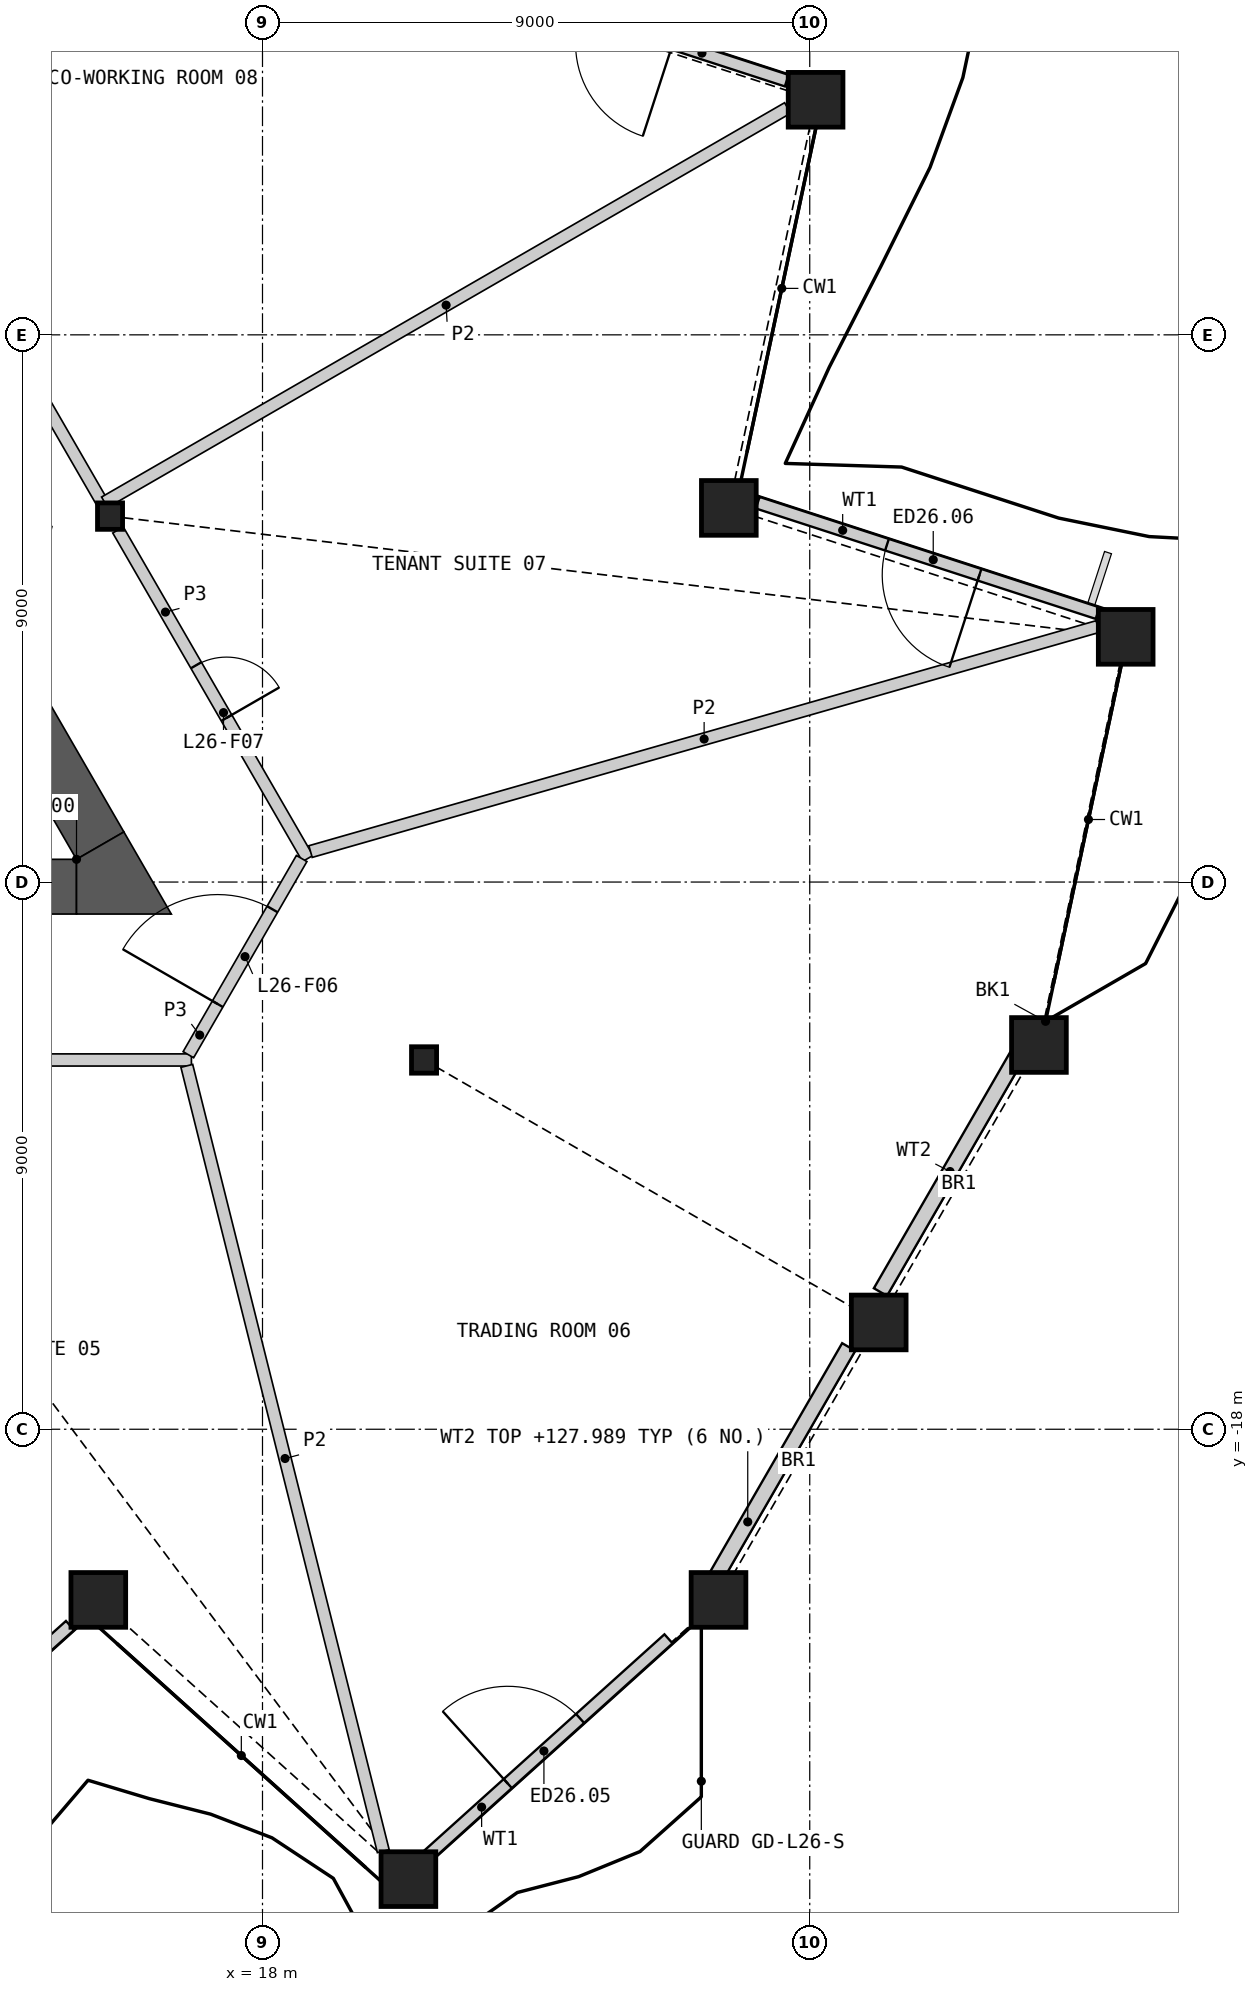
"""IFC4 building model, lengths in metres.
Left out: names, types, materials, properties, quantities, classifications, styles, units other than length and angle.
Written with IfcOpenShell. Run it as: python <this file> out.ifc"""

import sys

from ifc_helpers import new_model, si_unit, direction, frame, frame_2d, origin, origin_2d, place, context, subcontext, project, spatial, polyline, rectangle, hollow_rectangle, i_section, outline, extrude, element, fill, save


model = new_model("IFC4")
c1 = context("Model", 3, precision=1e-05, world=origin(), true_north=direction((0.0, 1.0)))
c2 = subcontext(c1, "Body", "Model", "MODEL_VIEW")
j1 = project(units=[si_unit("LENGTHUNIT", "METRE"), si_unit("PLANEANGLEUNIT", "RADIAN")], contexts=[c1])
p1 = place(None, origin())
s1 = spatial("IfcSite", under=j1, at=p1, CompositionType="ELEMENT")
p2 = place(p1, origin())
s2 = spatial("IfcBuilding", under=s1, at=p2, CompositionType="ELEMENT")
p3 = place(p2, frame((0.0, 0.0, 124.8)))
s3 = spatial("IfcBuildingStorey", under=s2, at=p3, CompositionType="ELEMENT", Elevation=124.8)
for number, where, z_axis, x_axis in (
    (1, (15.3, -20.807, 0.0), (0.0, 0.0, 1.0), (1.0, 0.0, 0.0)),
    (2, (20.4, -25.399, 0.0), (0.0, 0.0, 1.0), (1.0, 0.0, 0.0)),
    (3, (25.5, -20.807, 0.0), (0.0, 0.0, 1.0), (1.0, 0.0, 0.0)),
    (4, (28.135, -16.243, 0.0), (0.0, 0.0, 1.0), (1.0, 0.0, 0.0)),
    (5, (30.769, -11.68, 0.0), (0.0, 0.0, 1.0), (1.0, 0.0, 0.0)),
    (6, (32.196, -4.967, 0.0), (0.0, 0.0, 1.0), (1.0, 0.0, 0.0)),
    (7, (25.669, -2.846, 0.0), (0.0, 0.0, 1.0), (1.0, 0.0, 0.0)),
    (8, (27.096, 3.866, 0.0), (0.0, 0.0, 1.0), (1.0, 0.0, 0.0)),
):
    element("IfcColumn", number, at=place(p3, frame(where, z_axis=z_axis, x_axis=x_axis)), inside=s3, PredefinedType="COLUMN", context=c2, shape_type="SweptSolid", body=[
        extrude(hollow_rectangle(XDim=0.9, YDim=0.9, WallThickness=0.06, at=origin_2d()), origin(), (0.0, 0.0, 1.0), 4.2),
    ])
for number, where, z_axis, x_axis in (
    (9, (20.657, -11.926, 0.0), (0.0, 0.0, 1.0), (1.0, 0.0, 0.0)),
    (10, (15.493, -2.982, 0.0), (0.0, 0.0, 1.0), (1.0, 0.0, 0.0)),
):
    element("IfcColumn", number, at=place(p3, frame(where, z_axis=z_axis, x_axis=x_axis)), inside=s3, PredefinedType="COLUMN", context=c2, shape_type="SweptSolid", body=[
        extrude(i_section(OverallWidth=0.412, OverallDepth=0.435, WebThickness=0.036, FlangeThickness=0.057, at=origin_2d()), origin(), (0.0, 0.0, 1.0), 4.2),
    ])
p4 = place(p3, frame((10.492, -25.137, 0.0), z_axis=(0.0, 0.0, 1.0), x_axis=(0.743136230799, 0.669140151593, 0.0)))
e11 = element("IfcWall", 11, at=p4, inside=s3, PredefinedType="SOLIDWALL", context=c2, shape_type="SweptSolid", body=[
    extrude(rectangle(XDim=5.843, YDim=0.2, at=frame_2d((2.922, 0.0))), origin(), (0.0, 0.0, 1.0), 3.189),
])
p5 = place(p4, frame((1.957, 0.0, 0.0)))
e12 = element("IfcOpeningElement", 12, at=p5, cuts=e11, PredefinedType="OPENING", context=c2, shape_type="SweptSolid", body=[
    extrude(rectangle(XDim=1.6, YDim=2.4, at=frame_2d((0.8, 1.2))), frame((0.0, 0.11, 0.0), z_axis=(0.0, -1.0, 0.0), x_axis=(1.0, 0.0, 0.0)), (0.0, 0.0, 1.0), 0.22),
])
p6 = place(p3, frame((20.579, -25.137, 0.0), z_axis=(0.0, 0.0, 1.0), x_axis=(0.743148838472, 0.66912614945, 0.0)))
e13 = element("IfcWall", 13, at=p6, inside=s3, PredefinedType="SOLIDWALL", context=c2, shape_type="SweptSolid", body=[
    extrude(rectangle(XDim=5.515, YDim=0.2, at=frame_2d((2.757, 0.0))), origin(), (0.0, 0.0, 1.0), 3.189),
])
p7 = place(p6, frame((1.957, 0.0, 0.0)))
e14 = element("IfcOpeningElement", 14, at=p7, cuts=e13, PredefinedType="OPENING", context=c2, shape_type="SweptSolid", body=[
    extrude(rectangle(XDim=1.6, YDim=2.4, at=frame_2d((0.8, 1.2))), frame((0.0, 0.11, 0.0), z_axis=(0.0, -1.0, 0.0), x_axis=(1.0, 0.0, 0.0)), (0.0, 0.0, 1.0), 0.22),
])
p8 = place(p3, frame((25.427, -20.483, 0.0), z_axis=(0.0, 0.0, 1.0), x_axis=(0.499968989506, 0.866043306961, 0.0)))
e15 = element("IfcWall", 15, at=p8, inside=s3, PredefinedType="SOLIDWALL", context=c2, shape_type="SweptSolid", body=[
    extrude(rectangle(XDim=4.429, YDim=0.25, at=frame_2d((2.214, 0.0))), origin(), (0.0, 0.0, 1.0), 3.189),
])
p9 = place(p3, frame((28.163, -15.743, 0.0), z_axis=(0.0, 0.0, 1.0), x_axis=(0.500016357846, 0.866015959371, 0.0)))
e16 = element("IfcWall", 16, at=p9, inside=s3, PredefinedType="SOLIDWALL", context=c2, shape_type="SweptSolid", body=[
    extrude(rectangle(XDim=4.578, YDim=0.25, at=frame_2d((2.289, 0.0))), origin(), (0.0, 0.0, 1.0), 3.189),
])
p10 = place(p3, frame((31.734, -4.577, 0.0), z_axis=(0.0, 0.0, 1.0), x_axis=(-0.951060927669, 0.309003417231, 0.0)))
e17 = element("IfcWall", 17, at=p10, inside=s3, PredefinedType="SOLIDWALL", context=c2, shape_type="SweptSolid", body=[
    extrude(rectangle(XDim=5.877, YDim=0.2, at=frame_2d((2.939, 0.0))), origin(), (0.0, 0.0, 1.0), 3.189),
])
p11 = place(p10, frame((2.042, 0.0, 0.0)))
e18 = element("IfcOpeningElement", 18, at=p11, cuts=e17, PredefinedType="OPENING", context=c2, shape_type="SweptSolid", body=[
    extrude(rectangle(XDim=1.6, YDim=2.4, at=frame_2d((0.8, 1.2))), frame((0.0, 0.11, 0.0), z_axis=(0.0, -1.0, 0.0), x_axis=(1.0, 0.0, 0.0)), (0.0, 0.0, 1.0), 0.22),
])
p12 = place(p3, frame((26.622, 4.181, 0.0), z_axis=(0.0, 0.0, 1.0), x_axis=(-0.951053952554, 0.309024884649, 0.0)))
e19 = element("IfcWall", 19, at=p12, inside=s3, PredefinedType="SOLIDWALL", context=c2, shape_type="SweptSolid", body=[
    extrude(rectangle(XDim=5.865, YDim=0.2, at=frame_2d((2.932, 0.0))), origin(), (0.0, 0.0, 1.0), 3.189),
])
p13 = place(p12, frame((1.969, 0.0, 0.0)))
e20 = element("IfcOpeningElement", 20, at=p13, cuts=e19, PredefinedType="OPENING", context=c2, shape_type="SweptSolid", body=[
    extrude(rectangle(XDim=1.6, YDim=2.4, at=frame_2d((0.8, 1.2))), frame((0.0, 0.11, 0.0), z_axis=(0.0, -1.0, 0.0), x_axis=(1.0, 0.0, 0.0)), (0.0, 0.0, 1.0), 0.22),
])
p14 = place(p3, frame((3.913, -9.076, 0.0), z_axis=(0.0, 0.0, 1.0), x_axis=(1.0, 0.0, 0.0)))
e21 = element("IfcWall", 21, at=p14, inside=s3, PredefinedType="SHEAR", context=c2, shape_type="SweptSolid", body=[
    extrude(rectangle(XDim=11.029, YDim=0.9, at=frame_2d((5.514, 0.0))), origin(), (0.0, 0.0, 1.0), 3.8),
])
p15 = place(p3, frame((15.331, -8.401, 0.0), z_axis=(0.0, 0.0, 1.0), x_axis=(-0.499974938593, 0.866039872511, 0.0)))
e22 = element("IfcWall", 22, at=p15, inside=s3, PredefinedType="SHEAR", context=c2, shape_type="SweptSolid", body=[
    extrude(rectangle(XDim=4.046, YDim=0.9, at=frame_2d((2.023, 0.0))), origin(), (0.0, 0.0, 1.0), 3.8),
])
p16 = place(p3, origin())
e23 = element("IfcWall", 23, at=p16, inside=s3, PredefinedType="SHEAR", context=c2, shape_type="SweptSolid", body=[
    extrude(outline(polyline([(14.941, -8.626), (15.721, -8.176), (16.5, -9.526), (14.941, -9.526), (14.941, -8.626)])), origin(), (0.0, 0.0, 1.0), 3.8),
])
p17 = place(p3, frame((10.46, 5.736, 0.0), z_axis=(0.0, 0.0, 1.0), x_axis=(0.500004141693, -0.866023012564, 0.0)))
e24 = element("IfcWall", 24, at=p17, inside=s3, PredefinedType="PARTITIONING", context=c2, shape_type="SweptSolid", body=[
    extrude(rectangle(XDim=9.803, YDim=0.2, at=frame_2d((4.902, 0.0))), origin(), (0.0, 0.0, 1.0), 3.8),
])
p18 = place(p17, frame((4.352, 0.0, 0.0)))
e25 = element("IfcOpeningElement", 25, at=p18, cuts=e24, PredefinedType="OPENING", context=c2, shape_type="SweptSolid", body=[
    extrude(rectangle(XDim=1.0, YDim=2.1, at=frame_2d((0.5, 1.05))), frame((0.0, 0.11, 0.0), z_axis=(0.0, -1.0, 0.0), x_axis=(1.0, 0.0, 0.0)), (0.0, 0.0, 1.0), 0.22),
])
p19 = place(p3, frame((10.556, -11.926, 0.0), z_axis=(0.0, 0.0, 1.0), x_axis=(1.0, 0.0, 0.0)))
e26 = element("IfcWall", 26, at=p19, inside=s3, PredefinedType="PARTITIONING", context=c2, shape_type="SweptSolid", body=[
    extrude(rectangle(XDim=6.275, YDim=0.2, at=frame_2d((3.137, 0.0))), origin(), (0.0, 0.0, 1.0), 3.8),
])
p20 = place(p19, frame((2.587, 0.0, 0.0)))
e27 = element("IfcOpeningElement", 27, at=p20, cuts=e26, PredefinedType="OPENING", context=c2, shape_type="SweptSolid", body=[
    extrude(rectangle(XDim=1.0, YDim=2.1, at=frame_2d((0.5, 1.05))), frame((0.0, 0.11, 0.0), z_axis=(0.0, -1.0, 0.0), x_axis=(1.0, 0.0, 0.0)), (0.0, 0.0, 1.0), 0.22),
])
p21 = place(p3, frame((15.624, -3.209, 0.0), z_axis=(0.0, 0.0, 1.0), x_axis=(0.499997920671, -0.866026604282, 0.0)))
e28 = element("IfcWall", 28, at=p21, inside=s3, PredefinedType="PARTITIONING", context=c2, shape_type="SweptSolid", body=[
    extrude(rectangle(XDim=6.24, YDim=0.2, at=frame_2d((3.12, 0.0))), origin(), (0.0, 0.0, 1.0), 3.8),
])
p22 = place(p21, frame((2.57, 0.0, 0.0)))
e29 = element("IfcOpeningElement", 29, at=p22, cuts=e28, PredefinedType="OPENING", context=c2, shape_type="SweptSolid", body=[
    extrude(rectangle(XDim=1.0, YDim=2.1, at=frame_2d((0.5, 1.05))), frame((0.0, 0.11, 0.0), z_axis=(0.0, -1.0, 0.0), x_axis=(1.0, 0.0, 0.0)), (0.0, 0.0, 1.0), 0.22),
])
p23 = place(p3, frame((16.781, -11.84, 0.0), z_axis=(0.0, 0.0, 1.0), x_axis=(0.499958791762, 0.866049194065, 0.0)))
e30 = element("IfcWall", 30, at=p23, inside=s3, PredefinedType="PARTITIONING", context=c2, shape_type="SweptSolid", body=[
    extrude(rectangle(XDim=3.726, YDim=0.2, at=frame_2d((1.863, 0.0))), origin(), (0.0, 0.0, 1.0), 3.8),
])
p24 = place(p23, frame((0.963, 0.0, 0.0)))
e31 = element("IfcOpeningElement", 31, at=p24, cuts=e30, PredefinedType="OPENING", context=c2, shape_type="SweptSolid", body=[
    extrude(rectangle(XDim=1.8, YDim=2.1, at=frame_2d((0.9, 1.05))), frame((0.0, 0.11, 0.0), z_axis=(0.0, -1.0, 0.0), x_axis=(1.0, 0.0, 0.0)), (0.0, 0.0, 1.0), 0.22),
])
p25 = place(p3, frame((18.79, -8.499, 0.0), z_axis=(0.0, 0.0, 1.0), x_axis=(0.961478776026, 0.274879179372, 0.0)))
e32 = element("IfcWall", 32, at=p25, inside=s3, PredefinedType="PARTITIONING", context=c2, shape_type="SweptSolid", body=[
    extrude(rectangle(XDim=13.465, YDim=0.2, at=frame_2d((6.732, 0.0))), origin(), (0.0, 0.0, 1.0), 2.885),
])
p26 = place(p3, frame((16.755, -12.023, 0.0), z_axis=(0.0, 0.0, 1.0), x_axis=(0.242708204495, -0.97009933897, 0.0)))
e33 = element("IfcWall", 33, at=p26, inside=s3, PredefinedType="PARTITIONING", context=c2, shape_type="SweptSolid", body=[
    extrude(rectangle(XDim=13.314, YDim=0.2, at=frame_2d((6.657, 0.0))), origin(), (0.0, 0.0, 1.0), 2.885),
])
p27 = place(p3, frame((15.403, -2.754, 0.0), z_axis=(0.0, 0.0, 1.0), x_axis=(0.866024473704, 0.500001610943, 0.0)))
e34 = element("IfcWall", 34, at=p27, inside=s3, PredefinedType="PARTITIONING", context=c2, shape_type="SweptSolid", body=[
    extrude(rectangle(XDim=12.971, YDim=0.2, at=frame_2d((6.485, 0.0))), origin(), (0.0, 0.0, 1.0), 2.885),
])
p28 = place(p7, origin())
e35 = element("IfcDoor", 35, at=p28, inside=s3, OperationType="DOUBLE_DOOR_SINGLE_SWING", PredefinedType="DOOR", context=c2, shape_type="SweptSolid", body=[
    extrude(rectangle(XDim=1.6, YDim=2.4, at=frame_2d((0.8, 1.2))), frame((0.0, 0.025, 0.0), z_axis=(0.0, -1.0, 0.0), x_axis=(1.0, 0.0, 0.0)), (0.0, 0.0, 1.0), 0.05),
])
fill(e14, e35)
p29 = place(p11, origin())
e36 = element("IfcDoor", 36, at=p29, inside=s3, OperationType="DOUBLE_DOOR_SINGLE_SWING", PredefinedType="DOOR", context=c2, shape_type="SweptSolid", body=[
    extrude(rectangle(XDim=1.6, YDim=2.4, at=frame_2d((0.8, 1.2))), frame((0.0, 0.025, 0.0), z_axis=(0.0, -1.0, 0.0), x_axis=(1.0, 0.0, 0.0)), (0.0, 0.0, 1.0), 0.05),
])
fill(e18, e36)
p30 = place(p24, origin())
e37 = element("IfcDoor", 37, at=p30, inside=s3, OperationType="DOUBLE_DOOR_SINGLE_SWING", PredefinedType="DOOR", context=c2, shape_type="SweptSolid", body=[
    extrude(rectangle(XDim=1.8, YDim=2.1, at=frame_2d((0.9, 1.05))), frame((0.0, 0.025, 0.0), z_axis=(0.0, -1.0, 0.0), x_axis=(1.0, 0.0, 0.0)), (0.0, 0.0, 1.0), 0.05),
])
fill(e31, e37)
p31 = place(p22, origin())
e38 = element("IfcDoor", 38, at=p31, inside=s3, OperationType="SINGLE_SWING_RIGHT", PredefinedType="DOOR", context=c2, shape_type="SweptSolid", body=[
    extrude(rectangle(XDim=1.0, YDim=2.1, at=frame_2d((0.5, 1.05))), frame((0.0, 0.025, 0.0), z_axis=(0.0, -1.0, 0.0), x_axis=(1.0, 0.0, 0.0)), (0.0, 0.0, 1.0), 0.05),
])
fill(e29, e38)
save(model, sys.argv[1])
